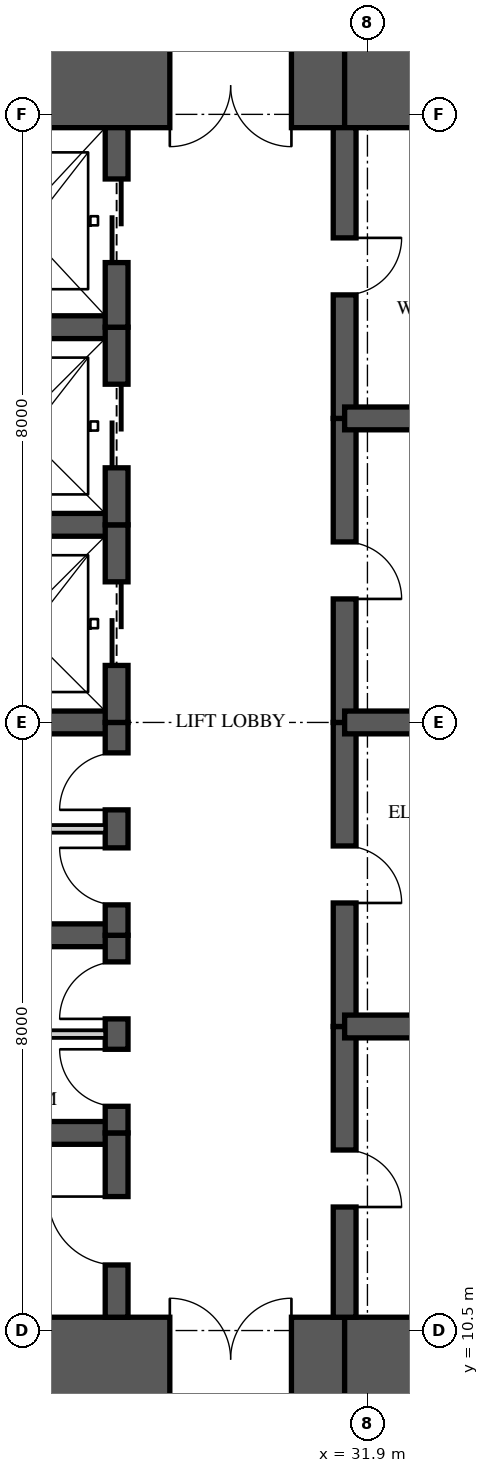
"""IFC4 building model, lengths in metres.
Left out: names, types, materials, properties, quantities, classifications, styles, units other than length and angle.
Written with IfcOpenShell. Run it as: python <this file> out.ifc"""

import sys

from ifc_helpers import new_model, si_unit, direction, frame, frame_2d, origin, place, context, subcontext, project, spatial, rectangle, extrude, element, fill, save


model = new_model("IFC4")
c1 = context("Model", 3, precision=1e-05, world=origin(), true_north=direction((0.0, 1.0)))
c2 = subcontext(c1, "Body", "Model", "MODEL_VIEW")
j1 = project(units=[si_unit("LENGTHUNIT", "METRE"), si_unit("PLANEANGLEUNIT", "RADIAN")], contexts=[c1])
p1 = place(None, origin())
s1 = spatial("IfcSite", under=j1, at=p1, CompositionType="ELEMENT")
p2 = place(p1, origin())
s2 = spatial("IfcBuilding", under=s1, at=p2, CompositionType="ELEMENT")
p3 = place(p2, frame((0.0, 0.0, 235.45)))
s3 = spatial("IfcBuildingStorey", under=s2, at=p3, CompositionType="ELEMENT", Elevation=235.45)
p4 = place(p3, frame((26.0, 10.125, 0.0), z_axis=(0.0, 0.0, 1.0), x_axis=(1.0, 0.0, 0.0)))
e1 = element("IfcWall", 1, at=p4, inside=s3, PredefinedType="SHEAR", context=c2, shape_type="SweptSolid", body=[
    extrude(rectangle(XDim=5.6, YDim=1.1, at=frame_2d((2.8, 0.0))), origin(), (0.0, 0.0, 1.0), 3.5),
])
p5 = place(p4, frame((3.3, 0.0, 0.0)))
e2 = element("IfcOpeningElement", 2, at=p5, cuts=e1, PredefinedType="OPENING", context=c2, shape_type="SweptSolid", body=[
    extrude(rectangle(XDim=1.6, YDim=2.1, at=frame_2d((0.8, 1.05))), frame((0.0, 0.56, 0.0), z_axis=(0.0, -1.0, 0.0), x_axis=(1.0, 0.0, 0.0)), (0.0, 0.0, 1.0), 1.12),
])
for number, where, z_axis, x_axis in (
    (3, (31.6, 10.125, 0.0), (0.0, 0.0, 1.0), (1.0, 0.0, 0.0)),
    (4, (35.9, 26.875, 0.0), (0.0, 0.0, 1.0), (-1.0, 0.0, 0.0)),
):
    element("IfcWall", number, at=place(p3, frame(where, z_axis=z_axis, x_axis=x_axis)), inside=s3, PredefinedType="SHEAR", context=c2, shape_type="SweptSolid", body=[
        extrude(rectangle(XDim=4.3, YDim=1.1, at=frame_2d((2.15, 0.0))), origin(), (0.0, 0.0, 1.0), 3.5),
    ])
p6 = place(p3, frame((31.6, 26.875, 0.0), z_axis=(0.0, 0.0, 1.0), x_axis=(-1.0, 0.0, 0.0)))
e5 = element("IfcWall", 5, at=p6, inside=s3, PredefinedType="SHEAR", context=c2, shape_type="SweptSolid", body=[
    extrude(rectangle(XDim=5.6, YDim=1.1, at=frame_2d((2.8, 0.0))), origin(), (0.0, 0.0, 1.0), 3.5),
])
p7 = place(p6, frame((0.7, 0.0, 0.0)))
e6 = element("IfcOpeningElement", 6, at=p7, cuts=e5, PredefinedType="OPENING", context=c2, shape_type="SweptSolid", body=[
    extrude(rectangle(XDim=1.6, YDim=2.1, at=frame_2d((0.8, 1.05))), frame((0.0, 0.56, 0.0), z_axis=(0.0, -1.0, 0.0), x_axis=(1.0, 0.0, 0.0)), (0.0, 0.0, 1.0), 1.12),
])
p8 = place(p3, frame((28.6, 10.675, 0.0), z_axis=(0.0, 0.0, 1.0), x_axis=(0.0, 1.0, 0.0)))
e7 = element("IfcWall", 7, at=p8, inside=s3, PredefinedType="SHEAR", context=c2, shape_type="SweptSolid", body=[
    extrude(rectangle(XDim=2.425, YDim=0.3, at=frame_2d((1.212, 0.0))), origin(), (0.0, 0.0, 1.0), 3.5),
])
p9 = place(p8, frame((0.688, 0.0, 0.0)))
e8 = element("IfcOpeningElement", 8, at=p9, cuts=e7, PredefinedType="OPENING", context=c2, shape_type="SweptSolid", body=[
    extrude(rectangle(XDim=0.9, YDim=2.1, at=frame_2d((0.45, 1.05))), frame((0.0, 0.16, 0.0), z_axis=(0.0, -1.0, 0.0), x_axis=(1.0, 0.0, 0.0)), (0.0, 0.0, 1.0), 0.32),
])
p10 = place(p3, frame((28.6, 13.1, 0.0), z_axis=(0.0, 0.0, 1.0), x_axis=(0.0, 1.0, 0.0)))
e9 = element("IfcWall", 9, at=p10, inside=s3, PredefinedType="SHEAR", context=c2, shape_type="SweptSolid", body=[
    extrude(rectangle(XDim=2.6, YDim=0.3, at=frame_2d((1.3, 0.0))), origin(), (0.0, 0.0, 1.0), 3.5),
])
p11 = place(p10, frame((0.35, 0.0, 0.0)))
e10 = element("IfcOpeningElement", 10, at=p11, cuts=e9, PredefinedType="OPENING", context=c2, shape_type="SweptSolid", body=[
    extrude(rectangle(XDim=0.75, YDim=2.1, at=frame_2d((0.375, 1.05))), frame((0.0, 0.16, 0.0), z_axis=(0.0, -1.0, 0.0), x_axis=(1.0, 0.0, 0.0)), (0.0, 0.0, 1.0), 0.32),
])
p12 = place(p10, frame((1.5, 0.0, 0.0)))
e11 = element("IfcOpeningElement", 11, at=p12, cuts=e9, PredefinedType="OPENING", context=c2, shape_type="SweptSolid", body=[
    extrude(rectangle(XDim=0.75, YDim=2.1, at=frame_2d((0.375, 1.05))), frame((0.0, 0.16, 0.0), z_axis=(0.0, -1.0, 0.0), x_axis=(1.0, 0.0, 0.0)), (0.0, 0.0, 1.0), 0.32),
])
p13 = place(p3, frame((28.6, 15.7, 0.0), z_axis=(0.0, 0.0, 1.0), x_axis=(0.0, 1.0, 0.0)))
e12 = element("IfcWall", 12, at=p13, inside=s3, PredefinedType="SHEAR", context=c2, shape_type="SweptSolid", body=[
    extrude(rectangle(XDim=2.8, YDim=0.3, at=frame_2d((1.4, 0.0))), origin(), (0.0, 0.0, 1.0), 3.5),
])
p14 = place(p13, frame((0.4, 0.0, 0.0)))
e13 = element("IfcOpeningElement", 13, at=p14, cuts=e12, PredefinedType="OPENING", context=c2, shape_type="SweptSolid", body=[
    extrude(rectangle(XDim=0.75, YDim=2.1, at=frame_2d((0.375, 1.05))), frame((0.0, 0.16, 0.0), z_axis=(0.0, -1.0, 0.0), x_axis=(1.0, 0.0, 0.0)), (0.0, 0.0, 1.0), 0.32),
])
p15 = place(p13, frame((1.65, 0.0, 0.0)))
e14 = element("IfcOpeningElement", 14, at=p15, cuts=e12, PredefinedType="OPENING", context=c2, shape_type="SweptSolid", body=[
    extrude(rectangle(XDim=0.75, YDim=2.1, at=frame_2d((0.375, 1.05))), frame((0.0, 0.16, 0.0), z_axis=(0.0, -1.0, 0.0), x_axis=(1.0, 0.0, 0.0)), (0.0, 0.0, 1.0), 0.32),
])
p16 = place(p3, frame((28.6, 18.5, 0.0), z_axis=(0.0, 0.0, 1.0), x_axis=(0.0, 1.0, 0.0)))
e15 = element("IfcWall", 15, at=p16, inside=s3, PredefinedType="SHEAR", context=c2, shape_type="SweptSolid", body=[
    extrude(rectangle(XDim=2.6, YDim=0.3, at=frame_2d((1.3, 0.0))), origin(), (0.0, 0.0, 1.0), 3.5),
])
p17 = place(p16, frame((0.75, 0.0, 0.0)))
e16 = element("IfcOpeningElement", 16, at=p17, cuts=e15, PredefinedType="OPENING", context=c2, shape_type="SweptSolid", body=[
    extrude(rectangle(XDim=1.1, YDim=2.1, at=frame_2d((0.55, 1.05))), frame((0.0, 0.16, 0.0), z_axis=(0.0, -1.0, 0.0), x_axis=(1.0, 0.0, 0.0)), (0.0, 0.0, 1.0), 0.32),
])
p18 = place(p3, frame((28.6, 21.1, 0.0), z_axis=(0.0, 0.0, 1.0), x_axis=(0.0, 1.0, 0.0)))
e17 = element("IfcWall", 17, at=p18, inside=s3, PredefinedType="SHEAR", context=c2, shape_type="SweptSolid", body=[
    extrude(rectangle(XDim=2.6, YDim=0.3, at=frame_2d((1.3, 0.0))), origin(), (0.0, 0.0, 1.0), 3.5),
])
p19 = place(p18, frame((0.75, 0.0, 0.0)))
e18 = element("IfcOpeningElement", 18, at=p19, cuts=e17, PredefinedType="OPENING", context=c2, shape_type="SweptSolid", body=[
    extrude(rectangle(XDim=1.1, YDim=2.1, at=frame_2d((0.55, 1.05))), frame((0.0, 0.16, 0.0), z_axis=(0.0, -1.0, 0.0), x_axis=(1.0, 0.0, 0.0)), (0.0, 0.0, 1.0), 0.32),
])
p20 = place(p3, frame((28.6, 23.7, 0.0), z_axis=(0.0, 0.0, 1.0), x_axis=(0.0, 1.0, 0.0)))
e19 = element("IfcWall", 19, at=p20, inside=s3, PredefinedType="SHEAR", context=c2, shape_type="SweptSolid", body=[
    extrude(rectangle(XDim=2.625, YDim=0.3, at=frame_2d((1.312, 0.0))), origin(), (0.0, 0.0, 1.0), 3.5),
])
p21 = place(p20, frame((0.85, 0.0, 0.0)))
e20 = element("IfcOpeningElement", 20, at=p21, cuts=e19, PredefinedType="OPENING", context=c2, shape_type="SweptSolid", body=[
    extrude(rectangle(XDim=1.1, YDim=2.1, at=frame_2d((0.55, 1.05))), frame((0.0, 0.16, 0.0), z_axis=(0.0, -1.0, 0.0), x_axis=(1.0, 0.0, 0.0)), (0.0, 0.0, 1.0), 0.32),
])
p22 = place(p3, frame((31.6, 10.675, 0.0), z_axis=(0.0, 0.0, 1.0), x_axis=(0.0, 1.0, 0.0)))
e21 = element("IfcWall", 21, at=p22, inside=s3, PredefinedType="SHEAR", context=c2, shape_type="SweptSolid", body=[
    extrude(rectangle(XDim=3.825, YDim=0.3, at=frame_2d((1.913, 0.0))), origin(), (0.0, 0.0, 1.0), 3.5),
])
p23 = place(p22, frame((1.45, 0.0, 0.0)))
e22 = element("IfcOpeningElement", 22, at=p23, cuts=e21, PredefinedType="OPENING", context=c2, shape_type="SweptSolid", body=[
    extrude(rectangle(XDim=0.75, YDim=2.1, at=frame_2d((0.375, 1.05))), frame((0.0, 0.16, 0.0), z_axis=(0.0, -1.0, 0.0), x_axis=(1.0, 0.0, 0.0)), (0.0, 0.0, 1.0), 0.32),
])
p24 = place(p3, frame((31.6, 14.5, 0.0), z_axis=(0.0, 0.0, 1.0), x_axis=(0.0, 1.0, 0.0)))
e23 = element("IfcWall", 23, at=p24, inside=s3, PredefinedType="SHEAR", context=c2, shape_type="SweptSolid", body=[
    extrude(rectangle(XDim=4.0, YDim=0.3, at=frame_2d((2.0, 0.0))), origin(), (0.0, 0.0, 1.0), 3.5),
])
p25 = place(p24, frame((1.625, 0.0, 0.0)))
e24 = element("IfcOpeningElement", 24, at=p25, cuts=e23, PredefinedType="OPENING", context=c2, shape_type="SweptSolid", body=[
    extrude(rectangle(XDim=0.75, YDim=2.1, at=frame_2d((0.375, 1.05))), frame((0.0, 0.16, 0.0), z_axis=(0.0, -1.0, 0.0), x_axis=(1.0, 0.0, 0.0)), (0.0, 0.0, 1.0), 0.32),
])
p26 = place(p3, frame((31.6, 18.5, 0.0), z_axis=(0.0, 0.0, 1.0), x_axis=(0.0, 1.0, 0.0)))
e25 = element("IfcWall", 25, at=p26, inside=s3, PredefinedType="SHEAR", context=c2, shape_type="SweptSolid", body=[
    extrude(rectangle(XDim=4.0, YDim=0.3, at=frame_2d((2.0, 0.0))), origin(), (0.0, 0.0, 1.0), 3.5),
])
p27 = place(p26, frame((1.625, 0.0, 0.0)))
e26 = element("IfcOpeningElement", 26, at=p27, cuts=e25, PredefinedType="OPENING", context=c2, shape_type="SweptSolid", body=[
    extrude(rectangle(XDim=0.75, YDim=2.1, at=frame_2d((0.375, 1.05))), frame((0.0, 0.16, 0.0), z_axis=(0.0, -1.0, 0.0), x_axis=(1.0, 0.0, 0.0)), (0.0, 0.0, 1.0), 0.32),
])
p28 = place(p3, frame((31.6, 22.5, 0.0), z_axis=(0.0, 0.0, 1.0), x_axis=(0.0, 1.0, 0.0)))
e27 = element("IfcWall", 27, at=p28, inside=s3, PredefinedType="SHEAR", context=c2, shape_type="SweptSolid", body=[
    extrude(rectangle(XDim=3.825, YDim=0.3, at=frame_2d((1.913, 0.0))), origin(), (0.0, 0.0, 1.0), 3.5),
])
p29 = place(p28, frame((1.625, 0.0, 0.0)))
e28 = element("IfcOpeningElement", 28, at=p29, cuts=e27, PredefinedType="OPENING", context=c2, shape_type="SweptSolid", body=[
    extrude(rectangle(XDim=0.75, YDim=2.1, at=frame_2d((0.375, 1.05))), frame((0.0, 0.16, 0.0), z_axis=(0.0, -1.0, 0.0), x_axis=(1.0, 0.0, 0.0)), (0.0, 0.0, 1.0), 0.32),
])
for number, where, z_axis, x_axis in (
    (29, (26.0, 13.1, 0.0), (0.0, 0.0, 1.0), (1.0, 0.0, 0.0)),
    (30, (26.0, 15.7, 0.0), (0.0, 0.0, 1.0), (1.0, 0.0, 0.0)),
    (31, (26.0, 18.5, 0.0), (0.0, 0.0, 1.0), (1.0, 0.0, 0.0)),
    (32, (26.0, 21.1, 0.0), (0.0, 0.0, 1.0), (1.0, 0.0, 0.0)),
    (33, (26.0, 23.7, 0.0), (0.0, 0.0, 1.0), (1.0, 0.0, 0.0)),
):
    element("IfcWall", number, at=place(p3, frame(where, z_axis=z_axis, x_axis=x_axis)), inside=s3, PredefinedType="SHEAR", context=c2, shape_type="SweptSolid", body=[
        extrude(rectangle(XDim=2.6, YDim=0.3, at=frame_2d((1.3, 0.0))), origin(), (0.0, 0.0, 1.0), 3.5),
    ])
for number, where, z_axis, x_axis in (
    (34, (31.6, 14.5, 0.0), (0.0, 0.0, 1.0), (1.0, 0.0, 0.0)),
    (35, (31.6, 18.5, 0.0), (0.0, 0.0, 1.0), (1.0, 0.0, 0.0)),
    (36, (31.6, 22.5, 0.0), (0.0, 0.0, 1.0), (1.0, 0.0, 0.0)),
):
    element("IfcWall", number, at=place(p3, frame(where, z_axis=z_axis, x_axis=x_axis)), inside=s3, PredefinedType="SHEAR", context=c2, shape_type="SweptSolid", body=[
        extrude(rectangle(XDim=4.3, YDim=0.3, at=frame_2d((2.15, 0.0))), origin(), (0.0, 0.0, 1.0), 3.5),
    ])
for number, where, z_axis, x_axis in (
    (37, (26.15, 14.4, 0.0), (0.0, 0.0, 1.0), (1.0, 0.0, 0.0)),
    (38, (26.15, 17.1, 0.0), (0.0, 0.0, 1.0), (1.0, 0.0, 0.0)),
):
    element("IfcWall", number, at=place(p3, frame(where, z_axis=z_axis, x_axis=x_axis)), inside=s3, PredefinedType="PARTITIONING", context=c2, shape_type="SweptSolid", body=[
        extrude(rectangle(XDim=2.3, YDim=0.1, at=frame_2d((1.15, 0.0))), origin(), (0.0, 0.0, 1.0), 3.26),
    ])
p30 = place(p17, origin())
e39 = element("IfcDoor", 39, at=p30, inside=s3, OperationType="SLIDING_TO_LEFT", PredefinedType="DOOR", context=c2, shape_type="SweptSolid", body=[
    extrude(rectangle(XDim=1.1, YDim=2.1, at=frame_2d((0.55, 1.05))), frame((0.0, 0.025, 0.0), z_axis=(0.0, -1.0, 0.0), x_axis=(1.0, 0.0, 0.0)), (0.0, 0.0, 1.0), 0.05),
])
fill(e16, e39)
p31 = place(p19, origin())
e40 = element("IfcDoor", 40, at=p31, inside=s3, OperationType="SLIDING_TO_LEFT", PredefinedType="DOOR", context=c2, shape_type="SweptSolid", body=[
    extrude(rectangle(XDim=1.1, YDim=2.1, at=frame_2d((0.55, 1.05))), frame((0.0, 0.025, 0.0), z_axis=(0.0, -1.0, 0.0), x_axis=(1.0, 0.0, 0.0)), (0.0, 0.0, 1.0), 0.05),
])
fill(e18, e40)
p32 = place(p21, origin())
e41 = element("IfcDoor", 41, at=p32, inside=s3, OperationType="SLIDING_TO_LEFT", PredefinedType="DOOR", context=c2, shape_type="SweptSolid", body=[
    extrude(rectangle(XDim=1.1, YDim=2.1, at=frame_2d((0.55, 1.05))), frame((0.0, 0.025, 0.0), z_axis=(0.0, -1.0, 0.0), x_axis=(1.0, 0.0, 0.0)), (0.0, 0.0, 1.0), 0.05),
])
fill(e20, e41)
p33 = place(p9, origin())
e42 = element("IfcDoor", 42, at=p33, inside=s3, OperationType="SINGLE_SWING_RIGHT", PredefinedType="DOOR", context=c2, shape_type="SweptSolid", body=[
    extrude(rectangle(XDim=0.9, YDim=2.1, at=frame_2d((0.45, 1.05))), frame((0.0, 0.025, 0.0), z_axis=(0.0, -1.0, 0.0), x_axis=(1.0, 0.0, 0.0)), (0.0, 0.0, 1.0), 0.05),
])
fill(e8, e42)
p34 = place(p11, origin())
e43 = element("IfcDoor", 43, at=p34, inside=s3, OperationType="SINGLE_SWING_RIGHT", PredefinedType="DOOR", context=c2, shape_type="SweptSolid", body=[
    extrude(rectangle(XDim=0.75, YDim=2.1, at=frame_2d((0.375, 1.05))), frame((0.0, 0.025, 0.0), z_axis=(0.0, -1.0, 0.0), x_axis=(1.0, 0.0, 0.0)), (0.0, 0.0, 1.0), 0.05),
])
fill(e10, e43)
p35 = place(p12, origin())
e44 = element("IfcDoor", 44, at=p35, inside=s3, OperationType="SINGLE_SWING_LEFT", PredefinedType="DOOR", context=c2, shape_type="SweptSolid", body=[
    extrude(rectangle(XDim=0.75, YDim=2.1, at=frame_2d((0.375, 1.05))), frame((0.0, 0.025, 0.0), z_axis=(0.0, -1.0, 0.0), x_axis=(1.0, 0.0, 0.0)), (0.0, 0.0, 1.0), 0.05),
])
fill(e11, e44)
p36 = place(p14, origin())
e45 = element("IfcDoor", 45, at=p36, inside=s3, OperationType="SINGLE_SWING_RIGHT", PredefinedType="DOOR", context=c2, shape_type="SweptSolid", body=[
    extrude(rectangle(XDim=0.75, YDim=2.1, at=frame_2d((0.375, 1.05))), frame((0.0, 0.025, 0.0), z_axis=(0.0, -1.0, 0.0), x_axis=(1.0, 0.0, 0.0)), (0.0, 0.0, 1.0), 0.05),
])
fill(e13, e45)
p37 = place(p15, origin())
e46 = element("IfcDoor", 46, at=p37, inside=s3, OperationType="SINGLE_SWING_LEFT", PredefinedType="DOOR", context=c2, shape_type="SweptSolid", body=[
    extrude(rectangle(XDim=0.75, YDim=2.1, at=frame_2d((0.375, 1.05))), frame((0.0, 0.025, 0.0), z_axis=(0.0, -1.0, 0.0), x_axis=(1.0, 0.0, 0.0)), (0.0, 0.0, 1.0), 0.05),
])
fill(e14, e46)
p38 = place(p5, origin())
e47 = element("IfcDoor", 47, at=p38, inside=s3, OperationType="DOUBLE_DOOR_SINGLE_SWING", PredefinedType="DOOR", context=c2, shape_type="SweptSolid", body=[
    extrude(rectangle(XDim=1.6, YDim=2.1, at=frame_2d((0.8, 1.05))), frame((0.0, 0.025, 0.0), z_axis=(0.0, -1.0, 0.0), x_axis=(1.0, 0.0, 0.0)), (0.0, 0.0, 1.0), 0.05),
])
fill(e2, e47)
p39 = place(p7, origin())
e48 = element("IfcDoor", 48, at=p39, inside=s3, OperationType="DOUBLE_DOOR_SINGLE_SWING", PredefinedType="DOOR", context=c2, shape_type="SweptSolid", body=[
    extrude(rectangle(XDim=1.6, YDim=2.1, at=frame_2d((0.8, 1.05))), frame((0.0, 0.025, 0.0), z_axis=(0.0, -1.0, 0.0), x_axis=(1.0, 0.0, 0.0)), (0.0, 0.0, 1.0), 0.05),
])
fill(e6, e48)
p40 = place(p23, frame((0.75, 0.0, 0.0), z_axis=(0.0, 0.0, 1.0), x_axis=(-1.0, 0.0, 0.0)))
e49 = element("IfcDoor", 49, at=p40, inside=s3, OperationType="SINGLE_SWING_RIGHT", PredefinedType="DOOR", context=c2, shape_type="SweptSolid", body=[
    extrude(rectangle(XDim=0.75, YDim=2.1, at=frame_2d((0.375, 1.05))), frame((0.0, 0.025, 0.0), z_axis=(0.0, -1.0, 0.0), x_axis=(1.0, 0.0, 0.0)), (0.0, 0.0, 1.0), 0.05),
])
fill(e22, e49)
p41 = place(p25, frame((0.75, 0.0, 0.0), z_axis=(0.0, 0.0, 1.0), x_axis=(-1.0, 0.0, 0.0)))
e50 = element("IfcDoor", 50, at=p41, inside=s3, OperationType="SINGLE_SWING_RIGHT", PredefinedType="DOOR", context=c2, shape_type="SweptSolid", body=[
    extrude(rectangle(XDim=0.75, YDim=2.1, at=frame_2d((0.375, 1.05))), frame((0.0, 0.025, 0.0), z_axis=(0.0, -1.0, 0.0), x_axis=(1.0, 0.0, 0.0)), (0.0, 0.0, 1.0), 0.05),
])
fill(e24, e50)
p42 = place(p27, frame((0.75, 0.0, 0.0), z_axis=(0.0, 0.0, 1.0), x_axis=(-1.0, 0.0, 0.0)))
e51 = element("IfcDoor", 51, at=p42, inside=s3, OperationType="SINGLE_SWING_RIGHT", PredefinedType="DOOR", context=c2, shape_type="SweptSolid", body=[
    extrude(rectangle(XDim=0.75, YDim=2.1, at=frame_2d((0.375, 1.05))), frame((0.0, 0.025, 0.0), z_axis=(0.0, -1.0, 0.0), x_axis=(1.0, 0.0, 0.0)), (0.0, 0.0, 1.0), 0.05),
])
fill(e26, e51)
p43 = place(p29, frame((0.75, 0.0, 0.0), z_axis=(0.0, 0.0, 1.0), x_axis=(-1.0, 0.0, 0.0)))
e52 = element("IfcDoor", 52, at=p43, inside=s3, OperationType="SINGLE_SWING_LEFT", PredefinedType="DOOR", context=c2, shape_type="SweptSolid", body=[
    extrude(rectangle(XDim=0.75, YDim=2.1, at=frame_2d((0.375, 1.05))), frame((0.0, 0.025, 0.0), z_axis=(0.0, -1.0, 0.0), x_axis=(1.0, 0.0, 0.0)), (0.0, 0.0, 1.0), 0.05),
])
fill(e28, e52)
save(model, sys.argv[1])
